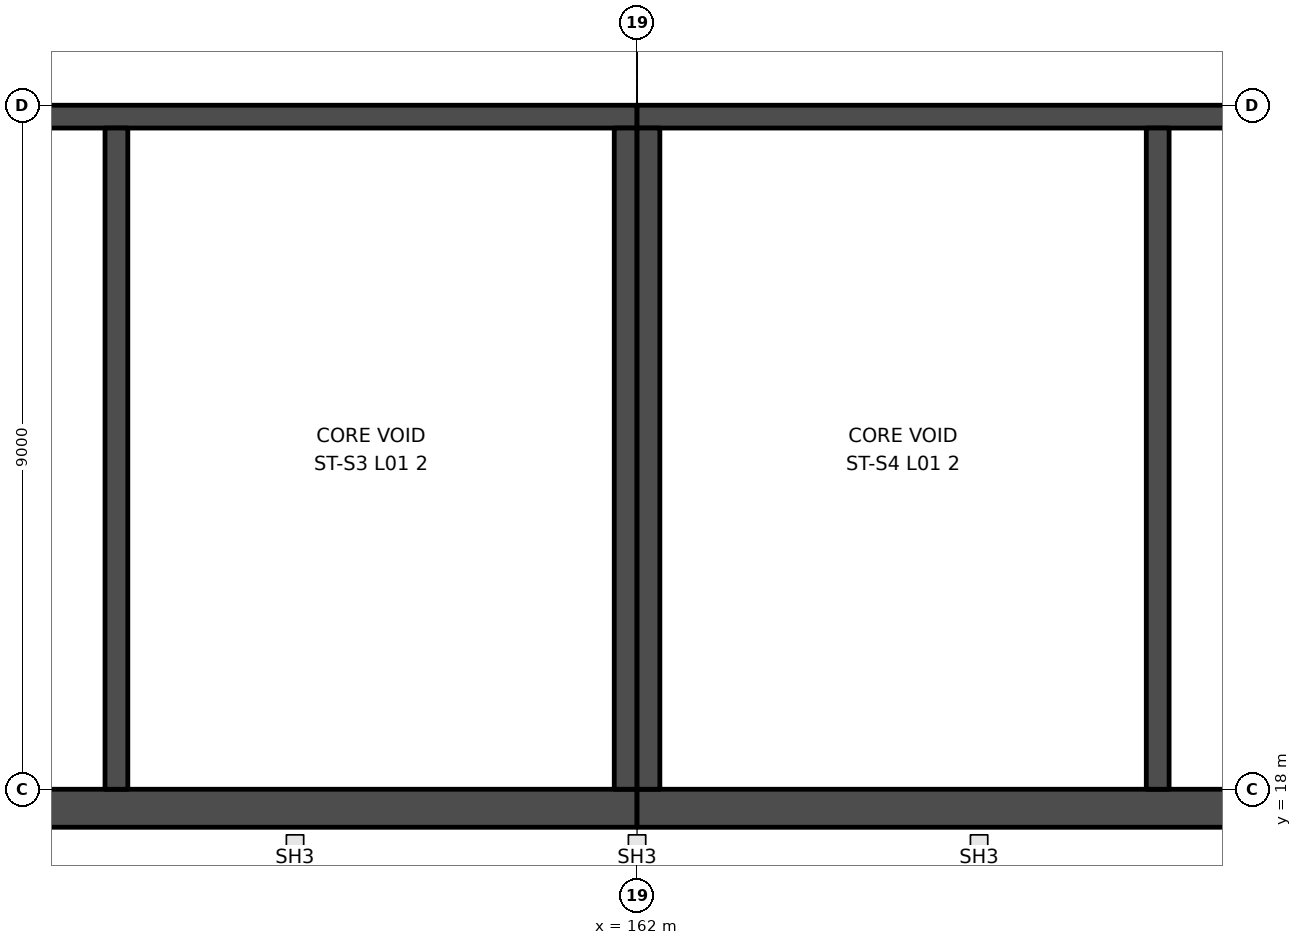
"""IFC4 building model, lengths in metres.
Left out: names, types, materials, properties, quantities, classifications, styles, units other than length and angle.
Written with IfcOpenShell. Run it as: python <this file> out.ifc"""

import sys

from ifc_helpers import new_model, si_unit, direction, frame, frame_2d, origin, place, context, subcontext, project, spatial, rectangle, extrude, element, save


model = new_model("IFC4")
c1 = context("Model", 3, precision=1e-05, world=origin(), true_north=direction((0.0, 1.0)))
c2 = subcontext(c1, "Body", "Model", "MODEL_VIEW")
j1 = project(units=[si_unit("LENGTHUNIT", "METRE"), si_unit("PLANEANGLEUNIT", "RADIAN")], contexts=[c1])
p1 = place(None, origin())
s1 = spatial("IfcSite", under=j1, at=p1, CompositionType="ELEMENT")
p2 = place(p1, origin())
s2 = spatial("IfcBuilding", under=s1, at=p2, CompositionType="ELEMENT")
p3 = place(p2, frame((0.0, 0.0, 7.0)))
s3 = spatial("IfcBuildingStorey", under=s2, at=p3, CompositionType="ELEMENT", Elevation=7.0)
p4 = place(p3, frame((144.0, 26.85, 0.0), z_axis=(0.0, 0.0, 1.0), x_axis=(1.0, 0.0, 0.0)))
e1 = element("IfcWall", 1, at=p4, inside=s3, PredefinedType="SHEAR", context=c2, shape_type="SweptSolid", body=[
    extrude(rectangle(XDim=18.0, YDim=0.3, at=frame_2d((9.0, 0.0))), origin(), (0.0, 0.0, 1.0), 4.5),
])
p5 = place(p4, frame((1.5, 0.0, 0.0)))
e2 = element("IfcOpeningElement", 2, at=p5, cuts=e1, PredefinedType="OPENING", context=c2, shape_type="SweptSolid", body=[
    extrude(rectangle(XDim=1.2, YDim=2.1, at=frame_2d((0.6, 1.05))), frame((0.0, 0.16, 0.0), z_axis=(0.0, -1.0, 0.0), x_axis=(1.0, 0.0, 0.0)), (0.0, 0.0, 1.0), 0.32),
])
p6 = place(p3, frame((144.0, 17.75, 0.0), z_axis=(0.0, 0.0, 1.0), x_axis=(1.0, 0.0, 0.0)))
e3 = element("IfcWall", 3, at=p6, inside=s3, PredefinedType="SHEAR", context=c2, shape_type="SweptSolid", body=[
    extrude(rectangle(XDim=18.0, YDim=0.5, at=frame_2d((9.0, 0.0))), origin(), (0.0, 0.0, 1.0), 4.5),
])
for number, where, z_axis, x_axis in (
    (4, (161.85, 26.7, 0.0), (0.0, 0.0, 1.0), (0.0, -1.0, 0.0)),
    (5, (155.15, 26.7, 0.0), (0.0, 0.0, 1.0), (0.0, -1.0, 0.0)),
):
    element("IfcWall", number, at=place(p3, frame(where, z_axis=z_axis, x_axis=x_axis)), inside=s3, PredefinedType="SHEAR", context=c2, shape_type="SweptSolid", body=[
        extrude(rectangle(XDim=8.7, YDim=0.3, at=frame_2d((4.35, 0.0))), origin(), (0.0, 0.0, 1.0), 4.5),
    ])
p7 = place(p3, frame((180.0, 26.85, 0.0), z_axis=(0.0, 0.0, 1.0), x_axis=(-1.0, 0.0, 0.0)))
e6 = element("IfcWall", 6, at=p7, inside=s3, PredefinedType="SHEAR", context=c2, shape_type="SweptSolid", body=[
    extrude(rectangle(XDim=18.0, YDim=0.3, at=frame_2d((9.0, 0.0))), origin(), (0.0, 0.0, 1.0), 4.5),
])
p8 = place(p7, frame((8.6, 0.0, 0.0)))
e7 = element("IfcOpeningElement", 7, at=p8, cuts=e6, PredefinedType="OPENING", context=c2, shape_type="SweptSolid", body=[
    extrude(rectangle(XDim=1.2, YDim=2.1, at=frame_2d((0.6, 1.05))), frame((0.0, 0.16, 0.0), z_axis=(0.0, -1.0, 0.0), x_axis=(1.0, 0.0, 0.0)), (0.0, 0.0, 1.0), 0.32),
])
p9 = place(p3, frame((180.0, 17.75, 0.0), z_axis=(0.0, 0.0, 1.0), x_axis=(-1.0, 0.0, 0.0)))
e8 = element("IfcWall", 8, at=p9, inside=s3, PredefinedType="SHEAR", context=c2, shape_type="SweptSolid", body=[
    extrude(rectangle(XDim=18.0, YDim=0.5, at=frame_2d((9.0, 0.0))), origin(), (0.0, 0.0, 1.0), 4.5),
])
for number, where, z_axis, x_axis in (
    (9, (162.15, 26.7, 0.0), (0.0, 0.0, 1.0), (0.0, -1.0, 0.0)),
    (10, (168.85, 26.7, 0.0), (0.0, 0.0, 1.0), (0.0, -1.0, 0.0)),
):
    element("IfcWall", number, at=place(p3, frame(where, z_axis=z_axis, x_axis=x_axis)), inside=s3, PredefinedType="SHEAR", context=c2, shape_type="SweptSolid", body=[
        extrude(rectangle(XDim=8.7, YDim=0.3, at=frame_2d((4.35, 0.0))), origin(), (0.0, 0.0, 1.0), 4.5),
    ])
save(model, sys.argv[1])
